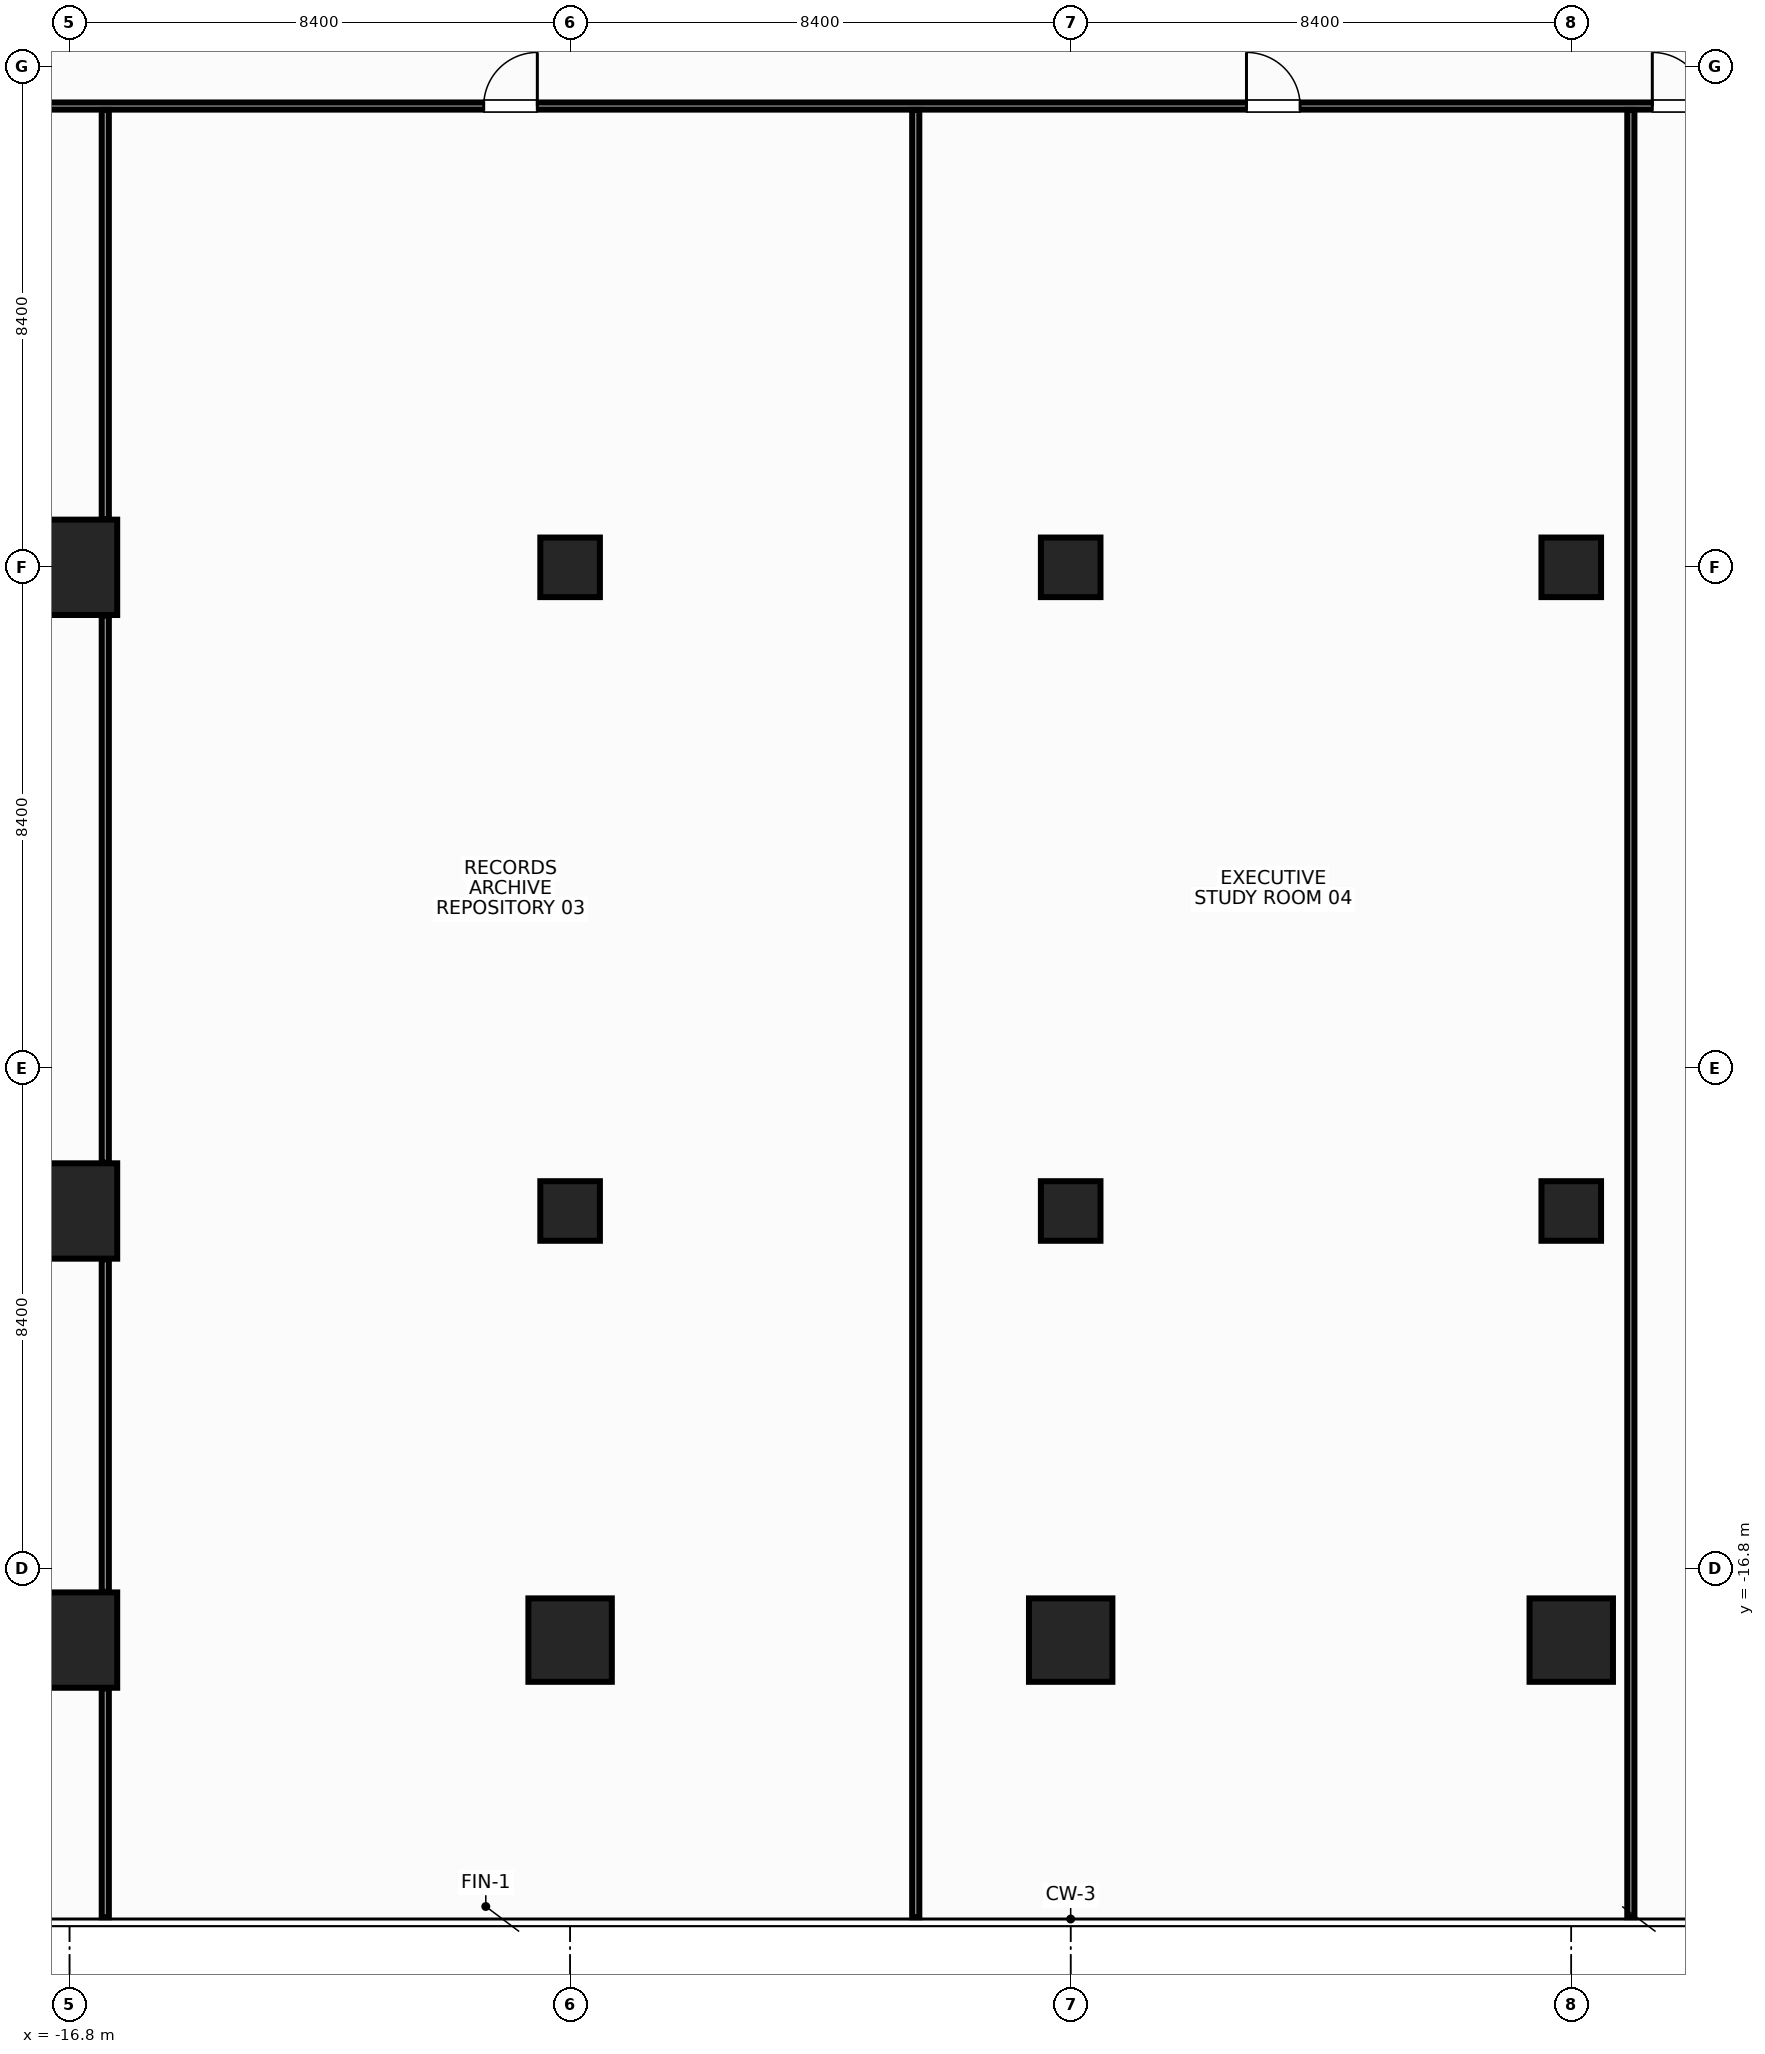
"""IFC4 building model, lengths in metres.
Left out: names, types, materials, properties, quantities, classifications, styles, units other than length and angle.
Written with IfcOpenShell. Run it as: python <this file> out.ifc"""

import sys

from ifc_helpers import new_model, si_unit, direction, frame, frame_2d, origin, origin_2d, place, context, subcontext, project, spatial, rectangle, hollow_rectangle, extrude, source, transform, mapped, element, fill, save


model = new_model("IFC4")
c1 = context("Model", 3, precision=1e-05, world=origin(), true_north=direction((0.0, 1.0)))
c2 = subcontext(c1, "Body", "Model", "MODEL_VIEW")
j1 = project(units=[si_unit("LENGTHUNIT", "METRE"), si_unit("PLANEANGLEUNIT", "RADIAN")], contexts=[c1])
p1 = place(None, origin())
s1 = spatial("IfcSite", under=j1, at=p1, CompositionType="ELEMENT")
p2 = place(p1, origin())
s2 = spatial("IfcBuilding", under=s1, at=p2, CompositionType="ELEMENT")
p3 = place(p2, frame((0.0, 0.0, 138.8)))
s3 = spatial("IfcBuildingStorey", under=s2, at=p3, CompositionType="ELEMENT", Elevation=138.8)
m1 = source(origin(), c2, "Body", "SweptSolid", [
    extrude(rectangle(XDim=1.6, YDim=1.6, at=origin_2d()), origin(), (0.0, 0.0, 1.0), 3.6),
])
for number, where, z_axis, x_axis in (
    (1, (-16.8, -18.0, 0.0), (0.0, 0.0, 1.0), (1.0, 0.0, 0.0)),
    (2, (-16.8, -10.8, 0.0), (0.0, 0.0, 1.0), (1.0, 0.0, 0.0)),
    (3, (-16.8, 0.0, 0.0), (0.0, 0.0, 1.0), (1.0, 0.0, 0.0)),
):
    element("IfcColumn", number, at=place(p3, frame(where, z_axis=z_axis, x_axis=x_axis)), inside=s3, PredefinedType="COLUMN", context=c2, shape_type="MappedRepresentation", body=[
        mapped(m1, transform((0.0, 0.0, 0.0), x_axis=(1.0, 0.0, 0.0), y_axis=(0.0, 1.0, 0.0), z_axis=(0.0, 0.0, 1.0), scale=1.0)),
    ])
m2 = source(origin(), c2, "Body", "SweptSolid", [
    extrude(rectangle(XDim=1.4, YDim=1.4, at=origin_2d()), origin(), (0.0, 0.0, 1.0), 3.6),
])
p4 = place(p3, frame((-8.4, -18.0, 0.0), z_axis=(0.0, 0.0, 1.0), x_axis=(1.0, 0.0, 0.0)))
e4 = element("IfcColumn", 4, at=p4, inside=s3, PredefinedType="COLUMN", context=c2, shape_type="MappedRepresentation", body=[
    mapped(m2, transform((0.0, 0.0, 0.0), x_axis=(1.0, 0.0, 0.0), y_axis=(0.0, 1.0, 0.0), z_axis=(0.0, 0.0, 1.0), scale=1.0)),
])
m3 = source(origin(), c2, "Body", "SweptSolid", [
    extrude(hollow_rectangle(XDim=1.0, YDim=1.0, WallThickness=0.045, at=origin_2d()), origin(), (0.0, 0.0, 1.0), 3.6),
])
for number, where, z_axis, x_axis in (
    (5, (-8.4, 0.0, 0.0), (0.0, 0.0, 1.0), (1.0, 0.0, 0.0)),
    (6, (-8.4, -10.8, 0.0), (0.0, 0.0, 1.0), (1.0, 0.0, 0.0)),
):
    element("IfcColumn", number, at=place(p3, frame(where, z_axis=z_axis, x_axis=x_axis)), inside=s3, PredefinedType="COLUMN", context=c2, shape_type="MappedRepresentation", body=[
        mapped(m3, transform((0.0, 0.0, 0.0), x_axis=(1.0, 0.0, 0.0), y_axis=(0.0, 1.0, 0.0), z_axis=(0.0, 0.0, 1.0), scale=1.0)),
    ])
p5 = place(p3, frame((8.4, -18.0, 0.0), z_axis=(0.0, 0.0, 1.0), x_axis=(1.0, 0.0, 0.0)))
e7 = element("IfcColumn", 7, at=p5, inside=s3, PredefinedType="COLUMN", context=c2, shape_type="MappedRepresentation", body=[
    mapped(m2, transform((0.0, 0.0, 0.0), x_axis=(1.0, 0.0, 0.0), y_axis=(0.0, 1.0, 0.0), z_axis=(0.0, 0.0, 1.0), scale=1.0)),
])
for number, where, z_axis, x_axis in (
    (8, (8.4, 0.0, 0.0), (0.0, 0.0, 1.0), (1.0, 0.0, 0.0)),
    (9, (8.4, -10.8, 0.0), (0.0, 0.0, 1.0), (1.0, 0.0, 0.0)),
):
    element("IfcColumn", number, at=place(p3, frame(where, z_axis=z_axis, x_axis=x_axis)), inside=s3, PredefinedType="COLUMN", context=c2, shape_type="MappedRepresentation", body=[
        mapped(m3, transform((0.0, 0.0, 0.0), x_axis=(1.0, 0.0, 0.0), y_axis=(0.0, 1.0, 0.0), z_axis=(0.0, 0.0, 1.0), scale=1.0)),
    ])
p6 = place(p3, frame((0.0, -18.0, 0.0), z_axis=(0.0, 0.0, 1.0), x_axis=(1.0, 0.0, 0.0)))
e10 = element("IfcColumn", 10, at=p6, inside=s3, PredefinedType="COLUMN", context=c2, shape_type="MappedRepresentation", body=[
    mapped(m2, transform((0.0, 0.0, 0.0), x_axis=(1.0, 0.0, 0.0), y_axis=(0.0, 1.0, 0.0), z_axis=(0.0, 0.0, 1.0), scale=1.0)),
])
m4 = source(origin(), c2, "Body", "SweptSolid", [
    extrude(rectangle(XDim=1.0, YDim=1.0, at=origin_2d()), origin(), (0.0, 0.0, 1.0), 3.6),
])
for number, where, z_axis, x_axis in (
    (11, (0.0, -10.8, 0.0), (0.0, 0.0, 1.0), (1.0, 0.0, 0.0)),
    (12, (0.0, 0.0, 0.0), (0.0, 0.0, 1.0), (1.0, 0.0, 0.0)),
):
    element("IfcColumn", number, at=place(p3, frame(where, z_axis=z_axis, x_axis=x_axis)), inside=s3, PredefinedType="COLUMN", context=c2, shape_type="MappedRepresentation", body=[
        mapped(m4, transform((0.0, 0.0, 0.0), x_axis=(1.0, 0.0, 0.0), y_axis=(0.0, 1.0, 0.0), z_axis=(0.0, 0.0, 1.0), scale=1.0)),
    ])
m5 = source(origin(), c2, "Body", "SweptSolid", [
    extrude(rectangle(XDim=31.6, YDim=0.12, at=frame_2d((15.8, 0.0))), origin(), (0.0, 0.0, 1.0), 2.765),
])
p7 = place(p3, frame((-20.52, 7.74, 0.0), z_axis=(0.0, 0.0, 1.0), x_axis=(1.0, 0.0, 0.0)))
e13 = element("IfcWall", 13, at=p7, inside=s3, PredefinedType="PARTITIONING", context=c2, shape_type="MappedRepresentation", body=[
    mapped(m5, transform((0.0, 0.0, 0.0), x_axis=(1.0, 0.0, 0.0), y_axis=(0.0, 1.0, 0.0), z_axis=(0.0, 0.0, 1.0), scale=1.0)),
])
p8 = place(p7, frame((1.74, 0.0, 0.0)))
e14 = element("IfcOpeningElement", 14, at=p8, cuts=e13, PredefinedType="OPENING", context=c2, shape_type="SweptSolid", body=[
    extrude(rectangle(XDim=0.9, YDim=2.15, at=frame_2d((0.45, 1.075))), frame((0.0, 0.072, 0.0), z_axis=(0.0, -1.0, 0.0), x_axis=(1.0, 0.0, 0.0)), (0.0, 0.0, 1.0), 0.144),
])
p9 = place(p7, frame((30.28, 0.0, 0.0)))
e15 = element("IfcOpeningElement", 15, at=p9, cuts=e13, PredefinedType="OPENING", context=c2, shape_type="SweptSolid", body=[
    extrude(rectangle(XDim=0.9, YDim=2.15, at=frame_2d((0.45, 1.075))), frame((0.0, 0.072, 0.0), z_axis=(0.0, -1.0, 0.0), x_axis=(1.0, 0.0, 0.0)), (0.0, 0.0, 1.0), 0.144),
])
p10 = place(p7, frame((10.67, 0.0, 0.0)))
e16 = element("IfcOpeningElement", 16, at=p10, cuts=e13, PredefinedType="OPENING", context=c2, shape_type="SweptSolid", body=[
    extrude(rectangle(XDim=0.9, YDim=2.15, at=frame_2d((0.45, 1.075))), frame((0.0, 0.072, 0.0), z_axis=(0.0, -1.0, 0.0), x_axis=(1.0, 0.0, 0.0)), (0.0, 0.0, 1.0), 0.144),
])
p11 = place(p7, frame((23.47, 0.0, 0.0)))
e17 = element("IfcOpeningElement", 17, at=p11, cuts=e13, PredefinedType="OPENING", context=c2, shape_type="SweptSolid", body=[
    extrude(rectangle(XDim=0.9, YDim=2.15, at=frame_2d((0.45, 1.075))), frame((0.0, 0.072, 0.0), z_axis=(0.0, -1.0, 0.0), x_axis=(1.0, 0.0, 0.0)), (0.0, 0.0, 1.0), 0.144),
])
m6 = source(origin(), c2, "Body", "SweptSolid", [
    extrude(rectangle(XDim=3.84, YDim=0.12, at=frame_2d((1.92, 0.0))), origin(), (0.0, 0.0, 1.0), 3.38),
])
p12 = place(p3, frame((-16.2, -22.65, 0.0), z_axis=(0.0, 0.0, 1.0), x_axis=(0.0, 1.0, 0.0)))
e18 = element("IfcWall", 18, at=p12, inside=s3, PredefinedType="PARTITIONING", context=c2, shape_type="MappedRepresentation", body=[
    mapped(m6, transform((0.0, 0.0, 0.0), x_axis=(1.0, 0.0, 0.0), y_axis=(0.0, 1.0, 0.0), z_axis=(0.0, 0.0, 1.0), scale=1.0)),
])
m7 = source(origin(), c2, "Body", "SweptSolid", [
    extrude(rectangle(XDim=5.58, YDim=0.12, at=frame_2d((2.79, 0.0))), origin(), (0.0, 0.0, 1.0), 3.38),
])
p13 = place(p3, frame((-16.2, -17.19, 0.0), z_axis=(0.0, 0.0, 1.0), x_axis=(0.0, 1.0, 0.0)))
e19 = element("IfcWall", 19, at=p13, inside=s3, PredefinedType="PARTITIONING", context=c2, shape_type="MappedRepresentation", body=[
    mapped(m7, transform((0.0, 0.0, 0.0), x_axis=(1.0, 0.0, 0.0), y_axis=(0.0, 1.0, 0.0), z_axis=(0.0, 0.0, 1.0), scale=1.0)),
])
m8 = source(origin(), c2, "Body", "SweptSolid", [
    extrude(rectangle(XDim=9.18, YDim=0.12, at=frame_2d((4.59, 0.0))), origin(), (0.0, 0.0, 1.0), 3.38),
])
p14 = place(p3, frame((-16.2, -9.99, 0.0), z_axis=(0.0, 0.0, 1.0), x_axis=(0.0, 1.0, 0.0)))
e20 = element("IfcWall", 20, at=p14, inside=s3, PredefinedType="PARTITIONING", context=c2, shape_type="MappedRepresentation", body=[
    mapped(m8, transform((0.0, 0.0, 0.0), x_axis=(1.0, 0.0, 0.0), y_axis=(0.0, 1.0, 0.0), z_axis=(0.0, 0.0, 1.0), scale=1.0)),
])
m9 = source(origin(), c2, "Body", "SweptSolid", [
    extrude(rectangle(XDim=6.865, YDim=0.12, at=frame_2d((3.433, 0.0))), origin(), (0.0, 0.0, 1.0), 2.665),
])
p15 = place(p3, frame((-16.2, 0.81, 0.0), z_axis=(0.0, 0.0, 1.0), x_axis=(0.0, 1.0, 0.0)))
e21 = element("IfcWall", 21, at=p15, inside=s3, PredefinedType="PARTITIONING", context=c2, shape_type="MappedRepresentation", body=[
    mapped(m9, transform((0.0, 0.0, 0.0), x_axis=(1.0, 0.0, 0.0), y_axis=(0.0, 1.0, 0.0), z_axis=(0.0, 0.0, 1.0), scale=1.0)),
])
m10 = source(origin(), c2, "Body", "SweptSolid", [
    extrude(rectangle(XDim=30.325, YDim=0.12, at=frame_2d((15.163, 0.0))), origin(), (0.0, 0.0, 1.0), 2.665),
])
for number, where, z_axis, x_axis in (
    (22, (-2.6, -22.65, 0.0), (0.0, 0.0, 1.0), (0.0, 1.0, 0.0)),
    (23, (9.4, -22.65, 0.0), (0.0, 0.0, 1.0), (0.0, 1.0, 0.0)),
):
    element("IfcWall", number, at=place(p3, frame(where, z_axis=z_axis, x_axis=x_axis)), inside=s3, PredefinedType="PARTITIONING", context=c2, shape_type="MappedRepresentation", body=[
        mapped(m10, transform((0.0, 0.0, 0.0), x_axis=(1.0, 0.0, 0.0), y_axis=(0.0, 1.0, 0.0), z_axis=(0.0, 0.0, 1.0), scale=1.0)),
    ])
m11 = source(origin(), c2, "Body", "SweptSolid", [
    extrude(rectangle(XDim=0.9, YDim=2.15, at=frame_2d((0.45, 1.075))), frame((0.0, 0.025, 0.0), z_axis=(0.0, -1.0, 0.0), x_axis=(1.0, 0.0, 0.0)), (0.0, 0.0, 1.0), 0.05),
])
p16 = place(p9, origin())
e24 = element("IfcDoor", 24, at=p16, inside=s3, OperationType="SINGLE_SWING_LEFT", PredefinedType="DOOR", context=c2, shape_type="MappedRepresentation", body=[
    mapped(m11, transform((0.0, 0.0, 0.0), x_axis=(1.0, 0.0, 0.0), y_axis=(0.0, 1.0, 0.0), z_axis=(0.0, 0.0, 1.0), scale=1.0)),
])
fill(e15, e24)
p17 = place(p10, origin())
e25 = element("IfcDoor", 25, at=p17, inside=s3, OperationType="SINGLE_SWING_RIGHT", PredefinedType="DOOR", context=c2, shape_type="MappedRepresentation", body=[
    mapped(m11, transform((0.0, 0.0, 0.0), x_axis=(1.0, 0.0, 0.0), y_axis=(0.0, 1.0, 0.0), z_axis=(0.0, 0.0, 1.0), scale=1.0)),
])
fill(e16, e25)
p18 = place(p11, origin())
e26 = element("IfcDoor", 26, at=p18, inside=s3, OperationType="SINGLE_SWING_LEFT", PredefinedType="DOOR", context=c2, shape_type="MappedRepresentation", body=[
    mapped(m11, transform((0.0, 0.0, 0.0), x_axis=(1.0, 0.0, 0.0), y_axis=(0.0, 1.0, 0.0), z_axis=(0.0, 0.0, 1.0), scale=1.0)),
])
fill(e17, e26)
save(model, sys.argv[1])
